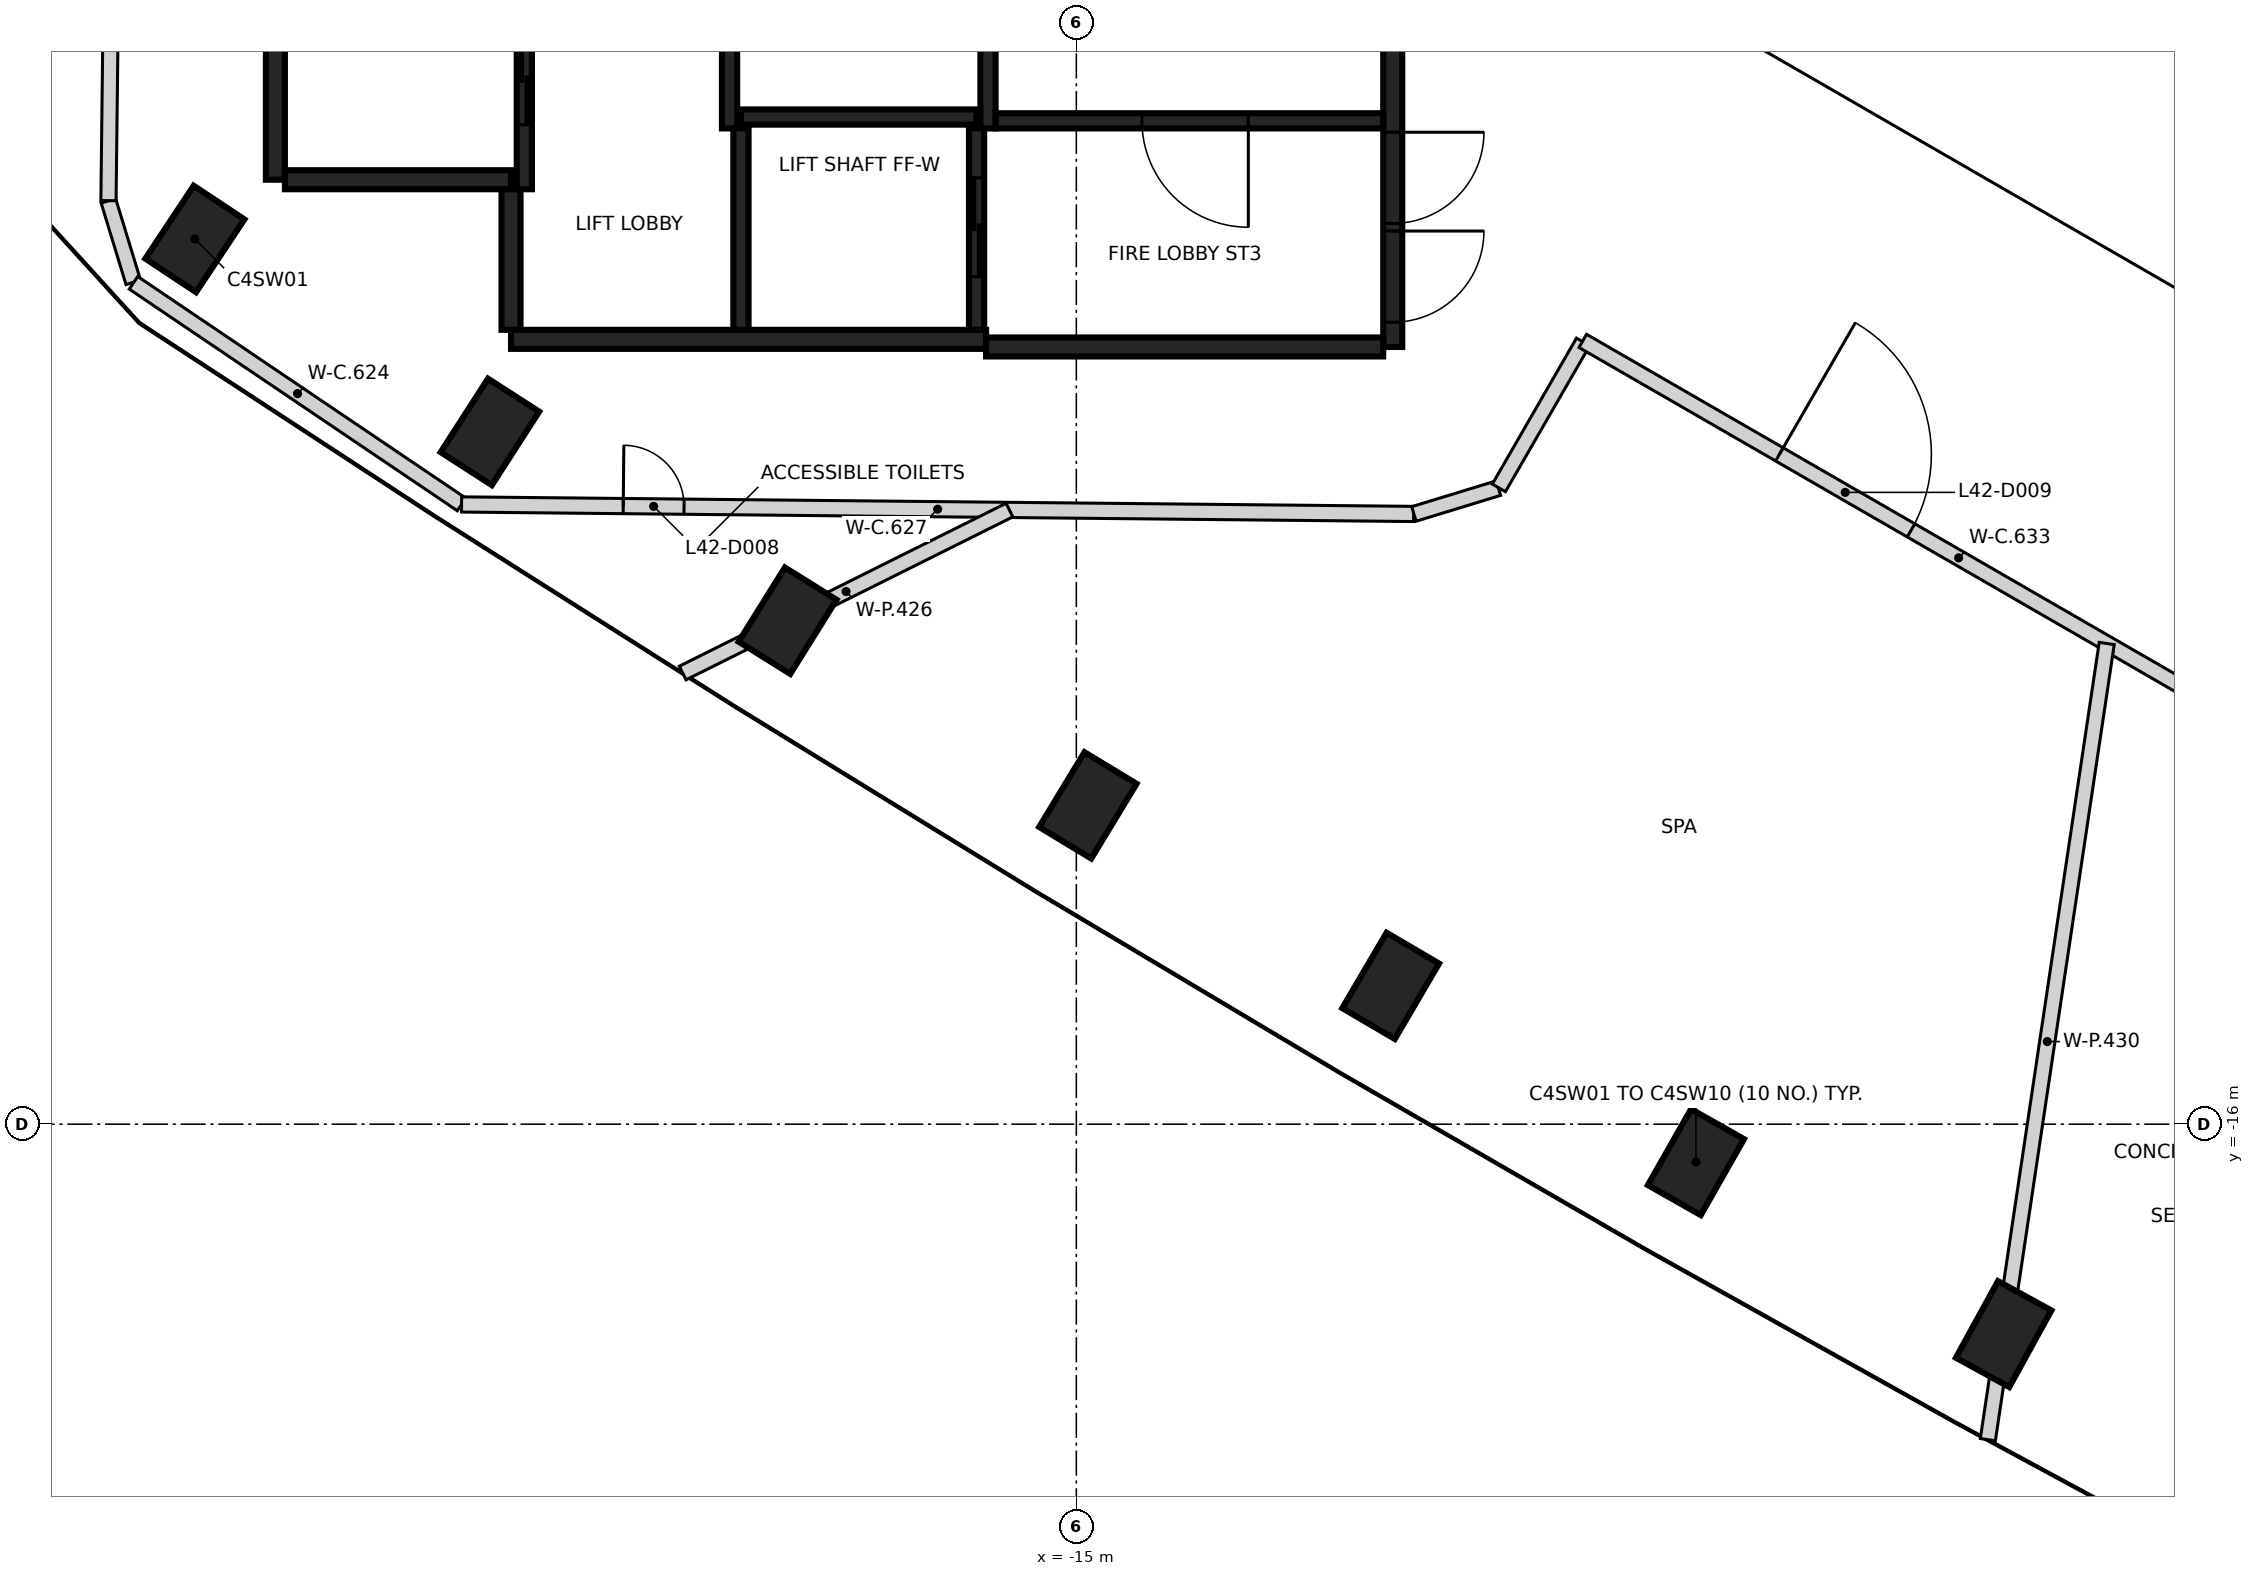
"""IFC4 building model, lengths in metres.
Left out: names, types, materials, properties, quantities, classifications, styles, units other than length and angle.
Written with IfcOpenShell. Run it as: python <this file> out.ifc"""

import sys

from ifc_helpers import new_model, si_unit, direction, frame, frame_2d, origin, origin_2d, place, context, subcontext, project, spatial, rectangle, extrude, element, fill, save


model = new_model("IFC4")
c1 = context("Model", 3, precision=1e-05, world=origin(), true_north=direction((0.0, 1.0)))
c2 = subcontext(c1, "Body", "Model", "MODEL_VIEW")
j1 = project(units=[si_unit("LENGTHUNIT", "METRE"), si_unit("PLANEANGLEUNIT", "RADIAN")], contexts=[c1])
p1 = place(None, origin())
s1 = spatial("IfcSite", under=j1, at=p1, CompositionType="ELEMENT")
p2 = place(p1, origin())
s2 = spatial("IfcBuilding", under=s1, at=p2, CompositionType="ELEMENT")
p3 = place(p2, frame((0.0, 0.0, 169.6)))
s3 = spatial("IfcBuildingStorey", under=s2, at=p3, CompositionType="ELEMENT", Elevation=169.6)
for number, where, z_axis, x_axis in (
    (1, (-26.597, -4.354, -0.35), (0.0, 0.0, 1.0), (0.553, 0.833, 0.0)),
    (2, (-22.715, -6.892, -0.35), (0.0, 0.0, 1.0), (0.541, 0.841, 0.0)),
    (3, (-18.799, -9.376, -0.35), (0.0, 0.0, 1.0), (0.529, 0.848, 0.0)),
    (4, (-14.848, -11.806, -0.35), (0.0, 0.0, 1.0), (0.518, 0.855, 0.0)),
    (5, (-10.864, -14.18, -0.35), (0.0, 0.0, 1.0), (0.506, 0.862, 0.0)),
    (6, (-6.848, -16.499, -0.35), (0.0, 0.0, 1.0), (0.494, 0.87, 0.0)),
    (7, (-2.8, -18.762, -0.35), (0.0, 0.0, 1.0), (0.482, 0.876, 0.0)),
):
    element("IfcColumn", number, at=place(p3, frame(where, z_axis=z_axis, x_axis=x_axis)), inside=s3, PredefinedType="COLUMN", context=c2, shape_type="SweptSolid", body=[
        extrude(rectangle(XDim=1.15, YDim=0.8, at=origin_2d()), origin(), (0.0, 0.0, 1.0), 6.0),
    ])
p4 = place(p3, frame((-10.837, 5.775, 0.0), z_axis=(0.0, 0.0, 1.0), x_axis=(0.0, -1.0, 0.0)))
e8 = element("IfcWall", 8, at=p4, inside=s3, PredefinedType="SHEAR", context=c2, shape_type="SweptSolid", body=[
    extrude(rectangle(XDim=11.55, YDim=0.25, at=frame_2d((5.775, 0.0))), origin(), (0.0, 0.0, 1.0), 5.65),
])
p5 = place(p4, frame((10.025, 0.0, 0.0)))
e9 = element("IfcOpeningElement", 9, at=p5, cuts=e8, PredefinedType="OPENING", context=c2, shape_type="SweptSolid", body=[
    extrude(rectangle(XDim=1.2, YDim=2.1, at=frame_2d((0.6, 1.05))), frame((0.0, 0.135, 0.0), z_axis=(0.0, -1.0, 0.0), x_axis=(1.0, 0.0, 0.0)), (0.0, 0.0, 1.0), 0.27),
])
p6 = place(p4, frame((8.725, 0.0, 0.0)))
e10 = element("IfcOpeningElement", 10, at=p6, cuts=e8, PredefinedType="OPENING", context=c2, shape_type="SweptSolid", body=[
    extrude(rectangle(XDim=1.2, YDim=2.1, at=frame_2d((0.6, 1.05))), frame((0.0, 0.135, 0.0), z_axis=(0.0, -1.0, 0.0), x_axis=(1.0, 0.0, 0.0)), (0.0, 0.0, 1.0), 0.27),
])
p7 = place(p3, frame((-16.187, -5.675, 0.0), z_axis=(0.0, 0.0, 1.0), x_axis=(-1.0, 0.0, 0.0)))
e11 = element("IfcWall", 11, at=p7, inside=s3, PredefinedType="SHEAR", context=c2, shape_type="SweptSolid", body=[
    extrude(rectangle(XDim=6.25, YDim=0.25, at=frame_2d((3.125, 0.0))), origin(), (0.0, 0.0, 1.0), 5.65),
])
p8 = place(p3, frame((-25.537, -3.575, 0.0), z_axis=(0.0, 0.0, 1.0), x_axis=(0.0, 1.0, 0.0)))
e12 = element("IfcWall", 12, at=p8, inside=s3, PredefinedType="SHEAR", context=c2, shape_type="SweptSolid", body=[
    extrude(rectangle(XDim=5.85, YDim=0.25, at=frame_2d((2.925, 0.0))), origin(), (0.0, 0.0, 1.0), 5.65),
])
p9 = place(p3, frame((-10.963, -5.775, 0.0), z_axis=(0.0, 0.0, 1.0), x_axis=(-1.0, 0.0, 0.0)))
e13 = element("IfcWall", 13, at=p9, inside=s3, PredefinedType="SHEAR", context=c2, shape_type="SweptSolid", body=[
    extrude(rectangle(XDim=5.225, YDim=0.25, at=frame_2d((2.612, 0.0))), origin(), (0.0, 0.0, 1.0), 5.65),
])
p10 = place(p3, frame((-22.437, -3.575, 0.0), z_axis=(0.0, 0.0, 1.0), x_axis=(-1.0, 0.0, 0.0)))
e14 = element("IfcWall", 14, at=p10, inside=s3, PredefinedType="SHEAR", context=c2, shape_type="SweptSolid", body=[
    extrude(rectangle(XDim=2.975, YDim=0.25, at=frame_2d((1.487, 0.0))), origin(), (0.0, 0.0, 1.0), 5.65),
])
p11 = place(p3, frame((-22.437, -5.55, 0.0), z_axis=(0.0, 0.0, 1.0), x_axis=(0.0, 1.0, 0.0)))
e15 = element("IfcWall", 15, at=p11, inside=s3, PredefinedType="SHEAR", context=c2, shape_type="SweptSolid", body=[
    extrude(rectangle(XDim=1.849, YDim=0.25, at=frame_2d((0.925, 0.0))), origin(), (0.0, 0.0, 1.0), 5.65),
])
p12 = place(p3, frame((-16.162, 2.951, 0.0), z_axis=(0.0, 0.0, 1.0), x_axis=(0.0, -1.0, 0.0)))
e16 = element("IfcWall", 16, at=p12, inside=s3, PredefinedType="SHEAR", context=c2, shape_type="SweptSolid", body=[
    extrude(rectangle(XDim=5.851, YDim=0.2, at=frame_2d((2.925, 0.0))), origin(), (0.0, 0.0, 1.0), 5.65),
])
p13 = place(p3, frame((-19.562, -2.9, 0.0), z_axis=(0.0, 0.0, 1.0), x_axis=(0.0, 1.0, 0.0)))
e17 = element("IfcWall", 17, at=p13, inside=s3, PredefinedType="SHEAR", context=c2, shape_type="SweptSolid", body=[
    extrude(rectangle(XDim=6.1, YDim=0.2, at=frame_2d((3.05, 0.0))), origin(), (0.0, 0.0, 1.0), 5.65),
])
p14 = place(p3, frame((-22.262, 2.4, 0.0), z_axis=(0.0, 0.0, 1.0), x_axis=(0.0, -1.0, 0.0)))
e18 = element("IfcWall", 18, at=p14, inside=s3, PredefinedType="SHEAR", context=c2, shape_type="SweptSolid", body=[
    extrude(rectangle(XDim=6.1, YDim=0.2, at=frame_2d((3.05, 0.0))), origin(), (0.0, 0.0, 1.0), 5.65),
])
p15 = place(p14, frame((1.0, 0.0, 0.0)))
e19 = element("IfcOpeningElement", 19, at=p15, cuts=e18, PredefinedType="OPENING", context=c2, shape_type="SweptSolid", body=[
    extrude(rectangle(XDim=1.2, YDim=2.1, at=frame_2d((0.6, 1.05))), frame((0.0, 0.11, 0.0), z_axis=(0.0, -1.0, 0.0), x_axis=(1.0, 0.0, 0.0)), (0.0, 0.0, 1.0), 0.22),
])
p16 = place(p14, frame((4.05, 0.0, 0.0)))
e20 = element("IfcOpeningElement", 20, at=p16, cuts=e18, PredefinedType="OPENING", context=c2, shape_type="SweptSolid", body=[
    extrude(rectangle(XDim=1.2, YDim=2.1, at=frame_2d((0.6, 1.05))), frame((0.0, 0.11, 0.0), z_axis=(0.0, -1.0, 0.0), x_axis=(1.0, 0.0, 0.0)), (0.0, 0.0, 1.0), 0.22),
])
p17 = place(p3, frame((-10.963, -2.8, 0.0), z_axis=(0.0, 0.0, 1.0), x_axis=(-1.0, 0.0, 0.0)))
e21 = element("IfcWall", 21, at=p17, inside=s3, PredefinedType="SHEAR", context=c2, shape_type="SweptSolid", body=[
    extrude(rectangle(XDim=5.098, YDim=0.2, at=frame_2d((2.549, 0.0))), origin(), (0.0, 0.0, 1.0), 5.65),
])
p18 = place(p17, frame((1.774, 0.0, 0.0)))
e22 = element("IfcOpeningElement", 22, at=p18, cuts=e21, PredefinedType="OPENING", context=c2, shape_type="SweptSolid", body=[
    extrude(rectangle(XDim=1.4, YDim=2.1, at=frame_2d((0.7, 1.05))), frame((0.0, 0.11, 0.0), z_axis=(0.0, -1.0, 0.0), x_axis=(1.0, 0.0, 0.0)), (0.0, 0.0, 1.0), 0.22),
])
p19 = place(p3, frame((-19.412, -2.75, 0.0), z_axis=(0.0, 0.0, 1.0), x_axis=(1.0, 0.0, 0.0)))
e23 = element("IfcWall", 23, at=p19, inside=s3, PredefinedType="SHEAR", context=c2, shape_type="SweptSolid", body=[
    extrude(rectangle(XDim=3.1, YDim=0.2, at=frame_2d((1.55, 0.0))), origin(), (0.0, 0.0, 1.0), 5.65),
])
p20 = place(p3, frame((-16.312, -2.898, 0.0), z_axis=(0.0, 0.0, 1.0), x_axis=(0.0, -1.0, 0.0)))
e24 = element("IfcWall", 24, at=p20, inside=s3, PredefinedType="SHEAR", context=c2, shape_type="SweptSolid", body=[
    extrude(rectangle(XDim=2.651, YDim=0.2, at=frame_2d((1.325, 0.0))), origin(), (0.0, 0.0, 1.0), 5.65),
])
p21 = place(p20, frame((0.652, 0.0, 0.0)))
e25 = element("IfcOpeningElement", 25, at=p21, cuts=e24, PredefinedType="OPENING", context=c2, shape_type="SweptSolid", body=[
    extrude(rectangle(XDim=1.3, YDim=2.1, at=frame_2d((0.65, 1.05))), frame((0.0, 0.11, 0.0), z_axis=(0.0, -1.0, 0.0), x_axis=(1.0, 0.0, 0.0)), (0.0, 0.0, 1.0), 0.22),
])
p22 = place(p3, frame((-19.412, -5.549, 0.0), z_axis=(0.0, 0.0, 1.0), x_axis=(0.0, 1.0, 0.0)))
e26 = element("IfcWall", 26, at=p22, inside=s3, PredefinedType="SHEAR", context=c2, shape_type="SweptSolid", body=[
    extrude(rectangle(XDim=2.651, YDim=0.2, at=frame_2d((1.325, 0.0))), origin(), (0.0, 0.0, 1.0), 5.65),
])
p23 = place(p3, frame((-27.734, -3.853, 0.0), z_axis=(0.0, 0.0, 1.0), x_axis=(0.291681664309, -0.956515450323, 0.0)))
e27 = element("IfcWall", 27, at=p23, inside=s3, PredefinedType="PARTITIONING", context=c2, shape_type="SweptSolid", body=[
    extrude(rectangle(XDim=1.121, YDim=0.2, at=frame_2d((0.561, 0.0))), origin(), (0.0, 0.0, 1.0), 5.65),
])
p24 = place(p3, frame((-27.733, -3.85, 0.0), z_axis=(0.0, 0.0, 1.0), x_axis=(0.011828232316, 0.999930044013, 0.0)))
e28 = element("IfcWall", 28, at=p24, inside=s3, PredefinedType="PARTITIONING", context=c2, shape_type="SweptSolid", body=[
    extrude(rectangle(XDim=7.142, YDim=0.2, at=frame_2d((3.571, 0.0))), origin(), (0.0, 0.0, 1.0), 4.75),
])
p25 = place(p3, frame((-27.404, -4.931, 0.0), z_axis=(0.0, 0.0, 1.0), x_axis=(0.828616586727, -0.559816534412, 0.0)))
e29 = element("IfcWall", 29, at=p25, inside=s3, PredefinedType="PARTITIONING", context=c2, shape_type="SweptSolid", body=[
    extrude(rectangle(XDim=5.209, YDim=0.2, at=frame_2d((2.604, 0.0))), origin(), (0.0, 0.0, 1.0), 5.65),
])
p26 = place(p3, frame((-23.088, -7.847, 0.0), z_axis=(0.0, 0.0, 1.0), x_axis=(0.999950210109, -0.009978842778, 0.0)))
e30 = element("IfcWall", 30, at=p26, inside=s3, PredefinedType="PARTITIONING", context=c2, shape_type="SweptSolid", body=[
    extrude(rectangle(XDim=12.527, YDim=0.2, at=frame_2d((6.263, 0.0))), origin(), (0.0, 0.0, 1.0), 4.75),
])
p27 = place(p26, frame((2.127, 0.0, 0.0)))
e31 = element("IfcOpeningElement", 31, at=p27, cuts=e30, PredefinedType="OPENING", context=c2, shape_type="SweptSolid", body=[
    extrude(rectangle(XDim=0.8, YDim=2.1, at=frame_2d((0.4, 1.05))), frame((0.0, 0.11, 0.0), z_axis=(0.0, -1.0, 0.0), x_axis=(1.0, 0.0, 0.0)), (0.0, 0.0, 1.0), 0.22),
])
p28 = place(p3, frame((-10.559, -7.972, 0.0), z_axis=(0.0, 0.0, 1.0), x_axis=(0.956340161393, 0.29225587369, 0.0)))
e32 = element("IfcWall", 32, at=p28, inside=s3, PredefinedType="PARTITIONING", context=c2, shape_type="SweptSolid", body=[
    extrude(rectangle(XDim=1.163, YDim=0.2, at=frame_2d((0.582, 0.0))), origin(), (0.0, 0.0, 1.0), 5.65),
])
p29 = place(p3, frame((-9.441, -7.629, 0.0), z_axis=(0.0, 0.0, 1.0), x_axis=(0.499620784327, 0.866244233382, 0.0)))
e33 = element("IfcWall", 33, at=p29, inside=s3, PredefinedType="PARTITIONING", context=c2, shape_type="SweptSolid", body=[
    extrude(rectangle(XDim=2.218, YDim=0.2, at=frame_2d((1.109, 0.0))), origin(), (0.0, 0.0, 1.0), 5.65),
])
p30 = place(p3, frame((-8.337, -5.695, 0.0), z_axis=(0.0, 0.0, 1.0), x_axis=(0.86605990967, -0.499940229289, 0.0)))
e34 = element("IfcWall", 34, at=p30, inside=s3, PredefinedType="PARTITIONING", context=c2, shape_type="SweptSolid", body=[
    extrude(rectangle(XDim=11.419, YDim=0.2, at=frame_2d((5.709, 0.0))), origin(), (0.0, 0.0, 1.0), 5.65),
])
p31 = place(p30, frame((2.987, 0.0, 0.0)))
e35 = element("IfcOpeningElement", 35, at=p31, cuts=e34, PredefinedType="OPENING", context=c2, shape_type="SweptSolid", body=[
    extrude(rectangle(XDim=2.0, YDim=2.1, at=frame_2d((1.0, 1.05))), frame((0.0, 0.11, 0.0), z_axis=(0.0, -1.0, 0.0), x_axis=(1.0, 0.0, 0.0)), (0.0, 0.0, 1.0), 0.22),
])
p32 = place(p30, frame((9.219, 0.0, 0.0)))
e36 = element("IfcOpeningElement", 36, at=p32, cuts=e34, PredefinedType="OPENING", context=c2, shape_type="SweptSolid", body=[
    extrude(rectangle(XDim=1.0, YDim=2.1, at=frame_2d((0.5, 1.05))), frame((0.0, 0.11, 0.0), z_axis=(0.0, -1.0, 0.0), x_axis=(1.0, 0.0, 0.0)), (0.0, 0.0, 1.0), 0.22),
])
p33 = place(p3, frame((-20.179, -10.065, 0.0), z_axis=(0.0, 0.0, 1.0), x_axis=(0.894904396717, 0.446257908318, 0.0)))
e37 = element("IfcWall", 37, at=p33, inside=s3, PredefinedType="PARTITIONING", context=c2, shape_type="SweptSolid", body=[
    extrude(rectangle(XDim=4.804, YDim=0.2, at=frame_2d((2.402, 0.0))), origin(), (0.0, 0.0, 1.0), 5.65),
])
p34 = place(p3, frame((-3.008, -20.15, 0.0), z_axis=(0.0, 0.0, 1.0), x_axis=(0.147679819905, 0.989035222221, 0.0)))
e38 = element("IfcWall", 38, at=p34, inside=s3, PredefinedType="PARTITIONING", context=c2, shape_type="SweptSolid", body=[
    extrude(rectangle(XDim=10.59, YDim=0.2, at=frame_2d((5.295, 0.0))), origin(), (0.0, 0.0, 1.0), 5.65),
])
p35 = place(p3, frame((0.0, 0.0, -0.35)))
p36 = place(p35, origin())
p37 = place(p36, frame((0.0, 0.0, 0.3)))
e39 = element("IfcWindow", 39, at=p37, inside=s3, PartitioningType="SINGLE_PANEL", PredefinedType="SKYLIGHT", context=c2, shape_type="SweptSolid", body=[
    extrude(rectangle(XDim=7.95, YDim=4.96, at=origin_2d()), origin(), (0.0, 0.0, 1.0), 0.05),
])
p38 = place(p21, origin())
e40 = element("IfcDoor", 40, at=p38, inside=s3, OperationType="SLIDING_TO_LEFT", PredefinedType="DOOR", context=c2, shape_type="SweptSolid", body=[
    extrude(rectangle(XDim=1.3, YDim=2.1, at=frame_2d((0.65, 1.05))), frame((0.0, 0.025, 0.0), z_axis=(0.0, -1.0, 0.0), x_axis=(1.0, 0.0, 0.0)), (0.0, 0.0, 1.0), 0.05),
])
fill(e25, e40)
p39 = place(p16, origin())
e41 = element("IfcDoor", 41, at=p39, inside=s3, OperationType="DOUBLE_DOOR_SLIDING", PredefinedType="DOOR", context=c2, shape_type="SweptSolid", body=[
    extrude(rectangle(XDim=1.2, YDim=2.1, at=frame_2d((0.6, 1.05))), frame((0.0, 0.025, 0.0), z_axis=(0.0, -1.0, 0.0), x_axis=(1.0, 0.0, 0.0)), (0.0, 0.0, 1.0), 0.05),
])
fill(e20, e41)
p40 = place(p5, origin())
e42 = element("IfcDoor", 42, at=p40, inside=s3, OperationType="SINGLE_SWING_LEFT", PredefinedType="DOOR", context=c2, shape_type="SweptSolid", body=[
    extrude(rectangle(XDim=1.2, YDim=2.1, at=frame_2d((0.6, 1.05))), frame((0.0, 0.025, 0.0), z_axis=(0.0, -1.0, 0.0), x_axis=(1.0, 0.0, 0.0)), (0.0, 0.0, 1.0), 0.05),
])
fill(e9, e42)
p41 = place(p6, origin())
e43 = element("IfcDoor", 43, at=p41, inside=s3, OperationType="SINGLE_SWING_RIGHT", PredefinedType="DOOR", context=c2, shape_type="SweptSolid", body=[
    extrude(rectangle(XDim=1.2, YDim=2.1, at=frame_2d((0.6, 1.05))), frame((0.0, 0.025, 0.0), z_axis=(0.0, -1.0, 0.0), x_axis=(1.0, 0.0, 0.0)), (0.0, 0.0, 1.0), 0.05),
])
fill(e10, e43)
p42 = place(p18, origin())
e44 = element("IfcDoor", 44, at=p42, inside=s3, OperationType="SINGLE_SWING_LEFT", PredefinedType="DOOR", context=c2, shape_type="SweptSolid", body=[
    extrude(rectangle(XDim=1.4, YDim=2.1, at=frame_2d((0.7, 1.05))), frame((0.0, 0.025, 0.0), z_axis=(0.0, -1.0, 0.0), x_axis=(1.0, 0.0, 0.0)), (0.0, 0.0, 1.0), 0.05),
])
fill(e22, e44)
p43 = place(p27, origin())
e45 = element("IfcDoor", 45, at=p43, inside=s3, OperationType="SINGLE_SWING_LEFT", PredefinedType="DOOR", context=c2, shape_type="SweptSolid", body=[
    extrude(rectangle(XDim=0.8, YDim=2.1, at=frame_2d((0.4, 1.05))), frame((0.0, 0.025, 0.0), z_axis=(0.0, -1.0, 0.0), x_axis=(1.0, 0.0, 0.0)), (0.0, 0.0, 1.0), 0.05),
])
fill(e31, e45)
p44 = place(p31, frame((2.0, 0.0, 0.0), z_axis=(0.0, 0.0, 1.0), x_axis=(-1.0, 0.0, 0.0)))
e46 = element("IfcDoor", 46, at=p44, inside=s3, OperationType="DOUBLE_DOOR_SINGLE_SWING", PredefinedType="DOOR", context=c2, shape_type="SweptSolid", body=[
    extrude(rectangle(XDim=2.0, YDim=2.1, at=frame_2d((1.0, 1.05))), frame((0.0, 0.025, 0.0), z_axis=(0.0, -1.0, 0.0), x_axis=(1.0, 0.0, 0.0)), (0.0, 0.0, 1.0), 0.05),
])
fill(e35, e46)
save(model, sys.argv[1])
